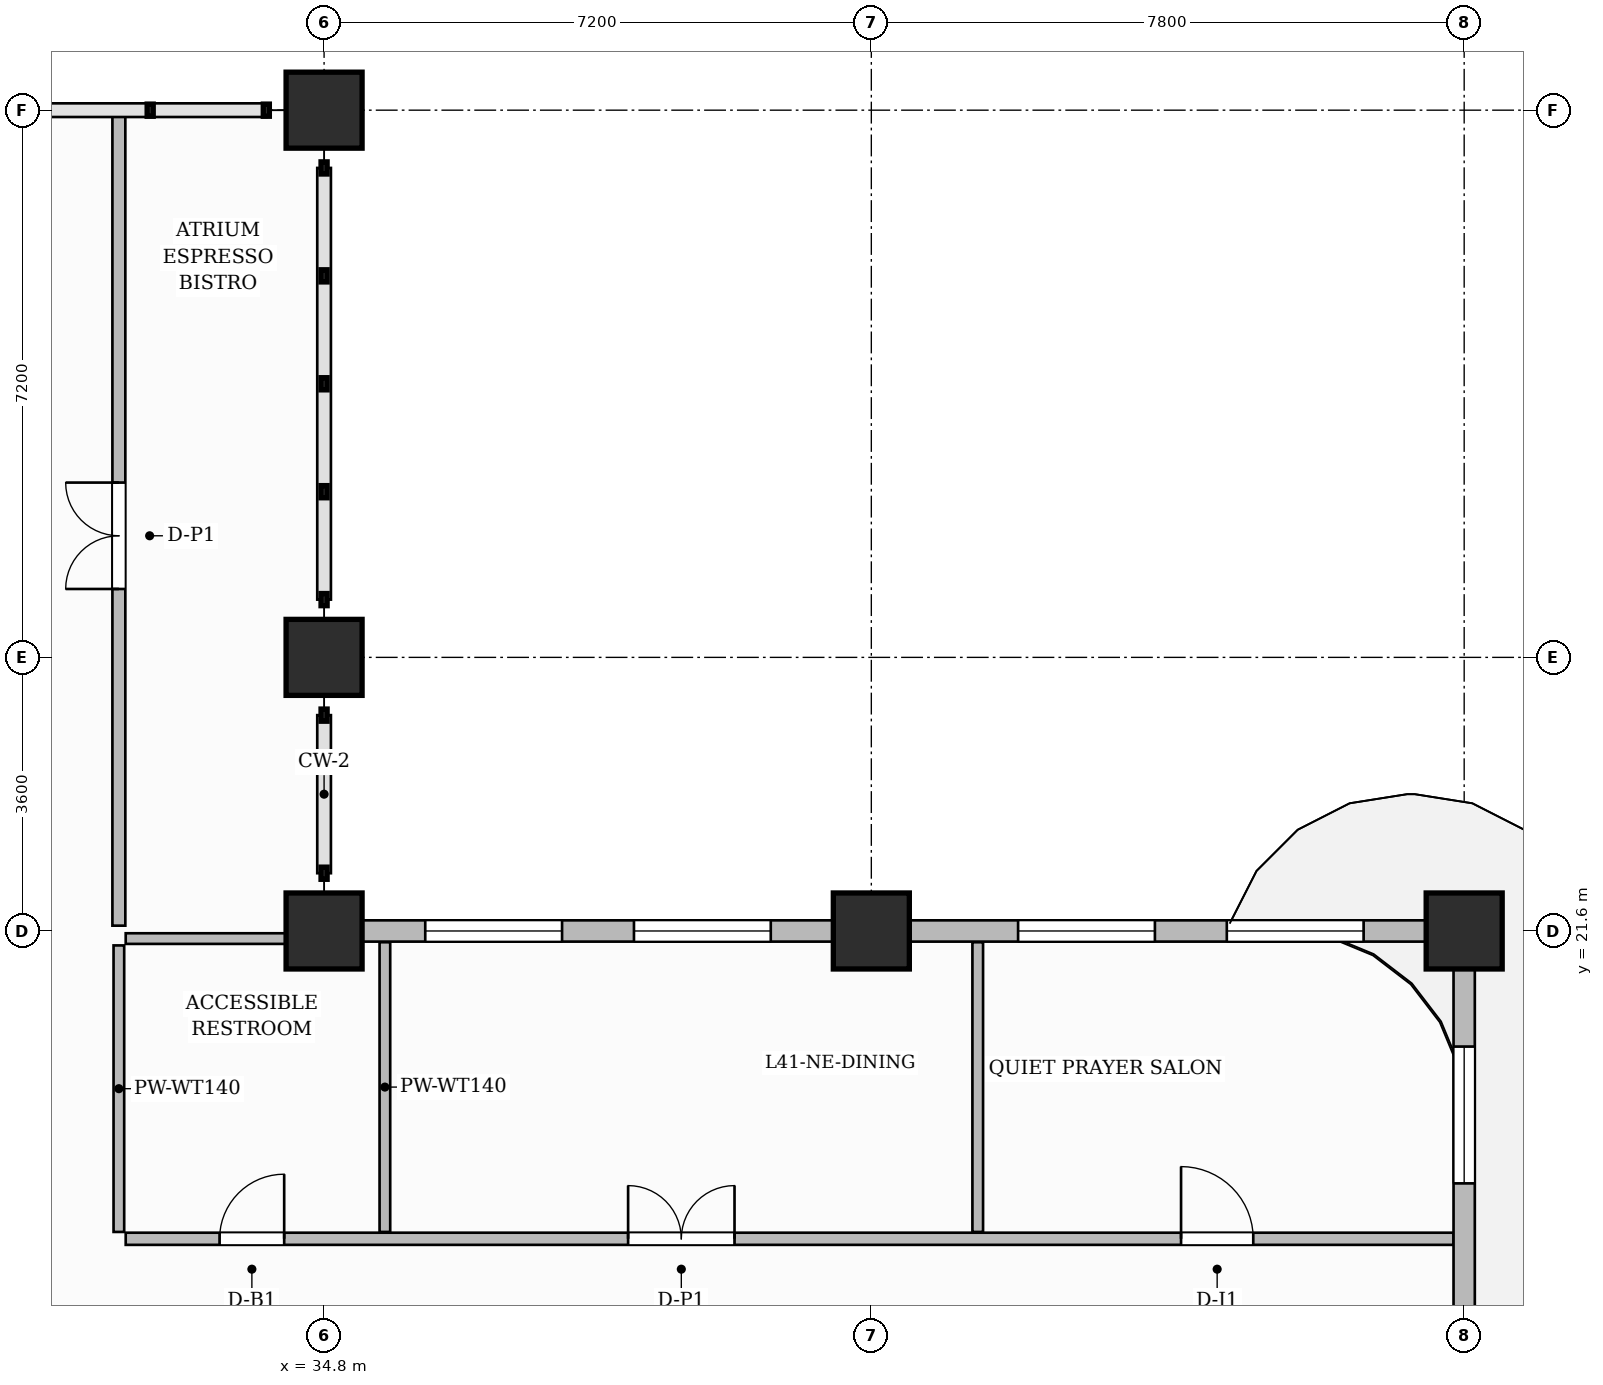
"""IFC4 building model, lengths in metres.
Left out: names, types, materials, properties, quantities, classifications, styles, units other than length and angle.
Written with IfcOpenShell. Run it as: python <this file> out.ifc"""

import sys

from ifc_helpers import new_model, si_unit, direction, frame, frame_2d, origin, origin_2d, place, context, subcontext, project, spatial, rectangle, extrude, source, transform, mapped, element, fill, save


model = new_model("IFC4")
c1 = context("Model", 3, precision=1e-05, world=origin(), true_north=direction((0.0, 1.0)))
c2 = subcontext(c1, "Body", "Model", "MODEL_VIEW")
j1 = project(units=[si_unit("LENGTHUNIT", "METRE"), si_unit("PLANEANGLEUNIT", "RADIAN")], contexts=[c1])
p1 = place(None, origin())
s1 = spatial("IfcSite", under=j1, at=p1, CompositionType="ELEMENT")
p2 = place(p1, origin())
s2 = spatial("IfcBuilding", under=s1, at=p2, CompositionType="ELEMENT")
p3 = place(p2, frame((0.0, 0.0, 165.7)))
s3 = spatial("IfcBuildingStorey", under=s2, at=p3, CompositionType="ELEMENT", Elevation=165.7)
m1 = source(origin(), c2, "Body", "SweptSolid", [
    extrude(rectangle(XDim=1.0, YDim=1.0, at=origin_2d()), origin(), (0.0, 0.0, 1.0), 3.85),
])
for number, where, z_axis, x_axis in (
    (1, (34.8, 21.6, 0.0), (0.0, 0.0, 1.0), (1.0, 0.0, 0.0)),
    (2, (34.8, 25.2, 0.0), (0.0, 0.0, 1.0), (1.0, 0.0, 0.0)),
    (3, (34.8, 32.4, 0.0), (0.0, 0.0, 1.0), (1.0, 0.0, 0.0)),
    (4, (42.0, 21.6, 0.0), (0.0, 0.0, 1.0), (1.0, 0.0, 0.0)),
    (5, (49.8, 21.6, 0.0), (0.0, 0.0, 1.0), (1.0, 0.0, 0.0)),
):
    element("IfcColumn", number, at=place(p3, frame(where, z_axis=z_axis, x_axis=x_axis)), inside=s3, PredefinedType="COLUMN", context=c2, shape_type="MappedRepresentation", body=[
        mapped(m1, transform((0.0, 0.0, 0.0), scale=1.0)),
    ])
p4 = place(p3, frame((32.19, 17.55, 0.0), z_axis=(0.0, 0.0, 1.0), x_axis=(1.0, 0.0, 0.0)))
e6 = element("IfcWall", 6, at=p4, inside=s3, PredefinedType="PARTITIONING", context=c2, shape_type="SweptSolid", body=[
    extrude(rectangle(XDim=17.47, YDim=0.16, at=frame_2d((8.735, 0.0))), origin(), (0.0, 0.0, 1.0), 3.6),
])
p5 = place(p4, frame((1.235, 0.0, 0.0)))
e7 = element("IfcOpeningElement", 7, at=p5, cuts=e6, PredefinedType="OPENING", context=c2, shape_type="SweptSolid", body=[
    extrude(rectangle(XDim=0.85, YDim=2.1, at=frame_2d((0.425, 1.05))), frame((0.0, 0.09, 0.0), z_axis=(0.0, -1.0, 0.0), x_axis=(1.0, 0.0, 0.0)), (0.0, 0.0, 1.0), 0.18),
])
p6 = place(p4, frame((6.61, 0.0, 0.0)))
e8 = element("IfcOpeningElement", 8, at=p6, cuts=e6, PredefinedType="OPENING", context=c2, shape_type="SweptSolid", body=[
    extrude(rectangle(XDim=1.4, YDim=2.35, at=frame_2d((0.7, 1.175))), frame((0.0, 0.09, 0.0), z_axis=(0.0, -1.0, 0.0), x_axis=(1.0, 0.0, 0.0)), (0.0, 0.0, 1.0), 0.18),
])
p7 = place(p4, frame((13.885, 0.0, 0.0)))
e9 = element("IfcOpeningElement", 9, at=p7, cuts=e6, PredefinedType="OPENING", context=c2, shape_type="SweptSolid", body=[
    extrude(rectangle(XDim=0.95, YDim=2.15, at=frame_2d((0.475, 1.075))), frame((0.0, 0.09, 0.0), z_axis=(0.0, -1.0, 0.0), x_axis=(1.0, 0.0, 0.0)), (0.0, 0.0, 1.0), 0.18),
])
p8 = place(p3, frame((32.1, 17.64, 0.0), z_axis=(0.0, 0.0, 1.0), x_axis=(0.0, 1.0, 0.0)))
e10 = element("IfcWall", 10, at=p8, inside=s3, PredefinedType="PARTITIONING", context=c2, shape_type="SweptSolid", body=[
    extrude(rectangle(XDim=3.77, YDim=0.14, at=frame_2d((1.885, 0.0))), origin(), (0.0, 0.0, 1.0), 3.6),
])
for number, where, z_axis, x_axis in (
    (11, (35.6, 17.64, 0.0), (0.0, 0.0, 1.0), (0.0, 1.0, 0.0)),
    (12, (43.4, 17.64, 0.0), (0.0, 0.0, 1.0), (0.0, 1.0, 0.0)),
):
    element("IfcWall", number, at=place(p3, frame(where, z_axis=z_axis, x_axis=x_axis)), inside=s3, PredefinedType="PARTITIONING", context=c2, shape_type="SweptSolid", body=[
        extrude(rectangle(XDim=3.812, YDim=0.14, at=frame_2d((1.906, 0.0))), origin(), (0.0, 0.0, 1.0), 3.6),
    ])
p9 = place(p3, frame((32.19, 21.5, 0.0), z_axis=(0.0, 0.0, 1.0), x_axis=(1.0, 0.0, 0.0)))
e13 = element("IfcWall", 13, at=p9, inside=s3, PredefinedType="PARTITIONING", context=c2, shape_type="SweptSolid", body=[
    extrude(rectangle(XDim=2.42, YDim=0.14, at=frame_2d((1.21, 0.0))), origin(), (0.0, 0.0, 1.0), 3.085),
])
p10 = place(p3, frame((32.1, 21.67, 0.0), z_axis=(0.0, 0.0, 1.0), x_axis=(0.0, 1.0, 0.0)))
e14 = element("IfcWall", 14, at=p10, inside=s3, PredefinedType="PARTITIONING", context=c2, shape_type="SweptSolid", body=[
    extrude(rectangle(XDim=10.702, YDim=0.17, at=frame_2d((5.351, 0.0))), origin(), (0.0, 0.0, 1.0), 3.6),
])
p11 = place(p10, frame((4.43, 0.0, 0.0)))
e15 = element("IfcOpeningElement", 15, at=p11, cuts=e14, PredefinedType="OPENING", context=c2, shape_type="SweptSolid", body=[
    extrude(rectangle(XDim=1.4, YDim=2.35, at=frame_2d((0.7, 1.175))), frame((0.0, 0.095, 0.0), z_axis=(0.0, -1.0, 0.0), x_axis=(1.0, 0.0, 0.0)), (0.0, 0.0, 1.0), 0.19),
])
p12 = place(p3, frame((49.8, 14.62, 0.0), z_axis=(0.0, 0.0, 1.0), x_axis=(0.0, 1.0, 0.0)))
e16 = element("IfcWall", 16, at=p12, inside=s3, PredefinedType="SOLIDWALL", context=c2, shape_type="SweptSolid", body=[
    extrude(rectangle(XDim=6.93, YDim=0.28, at=frame_2d((3.465, 0.0))), origin(), (0.0, 0.0, 1.0), 3.085),
])
p13 = place(p12, frame((0.42, 0.0, 0.0)))
e17 = element("IfcOpeningElement", 17, at=p13, cuts=e16, PredefinedType="OPENING", context=c2, shape_type="SweptSolid", body=[
    extrude(rectangle(XDim=1.2, YDim=2.2, at=frame_2d((0.6, 1.1))), frame((0.0, 0.15, 0.0), z_axis=(0.0, -1.0, 0.0), x_axis=(1.0, 0.0, 0.0)), (0.0, 0.0, 1.0), 0.3),
])
p14 = place(p12, frame((3.659, 0.0, 0.8)))
e18 = element("IfcOpeningElement", 18, at=p14, cuts=e16, PredefinedType="OPENING", context=c2, shape_type="SweptSolid", body=[
    extrude(rectangle(XDim=1.8, YDim=1.85, at=frame_2d((0.9, 0.925))), frame((0.0, 0.15, 0.0), z_axis=(0.0, -1.0, 0.0), x_axis=(1.0, 0.0, 0.0)), (0.0, 0.0, 1.0), 0.3),
])
p15 = place(p3, frame((34.8, 21.6, 0.0), z_axis=(0.0, 0.0, 1.0), x_axis=(1.0, 0.0, 0.0)))
e19 = element("IfcWall", 19, at=p15, inside=s3, PredefinedType="SOLIDWALL", context=c2, shape_type="SweptSolid", body=[
    extrude(rectangle(XDim=15.0, YDim=0.28, at=frame_2d((7.5, 0.0))), origin(), (0.0, 0.0, 1.0), 3.085),
])
p16 = place(p15, frame((1.331, 0.0, 0.8)))
e20 = element("IfcOpeningElement", 20, at=p16, cuts=e19, PredefinedType="OPENING", context=c2, shape_type="SweptSolid", body=[
    extrude(rectangle(XDim=1.8, YDim=1.85, at=frame_2d((0.9, 0.925))), frame((0.0, 0.15, 0.0), z_axis=(0.0, -1.0, 0.0), x_axis=(1.0, 0.0, 0.0)), (0.0, 0.0, 1.0), 0.3),
])
p17 = place(p15, frame((4.077, 0.0, 0.8)))
e21 = element("IfcOpeningElement", 21, at=p17, cuts=e19, PredefinedType="OPENING", context=c2, shape_type="SweptSolid", body=[
    extrude(rectangle(XDim=1.8, YDim=1.85, at=frame_2d((0.9, 0.925))), frame((0.0, 0.15, 0.0), z_axis=(0.0, -1.0, 0.0), x_axis=(1.0, 0.0, 0.0)), (0.0, 0.0, 1.0), 0.3),
])
p18 = place(p15, frame((9.131, 0.0, 0.8)))
e22 = element("IfcOpeningElement", 22, at=p18, cuts=e19, PredefinedType="OPENING", context=c2, shape_type="SweptSolid", body=[
    extrude(rectangle(XDim=1.8, YDim=1.85, at=frame_2d((0.9, 0.925))), frame((0.0, 0.15, 0.0), z_axis=(0.0, -1.0, 0.0), x_axis=(1.0, 0.0, 0.0)), (0.0, 0.0, 1.0), 0.3),
])
p19 = place(p15, frame((11.877, 0.0, 0.8)))
e23 = element("IfcOpeningElement", 23, at=p19, cuts=e19, PredefinedType="OPENING", context=c2, shape_type="SweptSolid", body=[
    extrude(rectangle(XDim=1.8, YDim=1.85, at=frame_2d((0.9, 0.925))), frame((0.0, 0.15, 0.0), z_axis=(0.0, -1.0, 0.0), x_axis=(1.0, 0.0, 0.0)), (0.0, 0.0, 1.0), 0.3),
])
m2 = source(origin(), c2, "Body", "SweptSolid", [
    extrude(rectangle(XDim=0.85, YDim=2.1, at=frame_2d((0.425, 1.05))), frame((0.0, 0.025, 0.0), z_axis=(0.0, -1.0, 0.0), x_axis=(1.0, 0.0, 0.0)), (0.0, 0.0, 1.0), 0.05),
])
p20 = place(p5, origin())
e24 = element("IfcDoor", 24, at=p20, inside=s3, OperationType="SINGLE_SWING_RIGHT", PredefinedType="DOOR", context=c2, shape_type="MappedRepresentation", body=[
    mapped(m2, transform((0.0, 0.0, 0.0), scale=1.0)),
])
fill(e7, e24)
m3 = source(origin(), c2, "Body", "SweptSolid", [
    extrude(rectangle(XDim=1.4, YDim=2.35, at=frame_2d((0.7, 1.175))), frame((0.0, 0.025, 0.0), z_axis=(0.0, -1.0, 0.0), x_axis=(1.0, 0.0, 0.0)), (0.0, 0.0, 1.0), 0.05),
])
p21 = place(p6, origin())
e25 = element("IfcDoor", 25, at=p21, inside=s3, OperationType="DOUBLE_DOOR_SINGLE_SWING", PredefinedType="DOOR", context=c2, shape_type="MappedRepresentation", body=[
    mapped(m3, transform((0.0, 0.0, 0.0), scale=1.0)),
])
fill(e8, e25)
m4 = source(origin(), c2, "Body", "SweptSolid", [
    extrude(rectangle(XDim=0.95, YDim=2.15, at=frame_2d((0.475, 1.075))), frame((0.0, 0.025, 0.0), z_axis=(0.0, -1.0, 0.0), x_axis=(1.0, 0.0, 0.0)), (0.0, 0.0, 1.0), 0.05),
])
p22 = place(p7, origin())
e26 = element("IfcDoor", 26, at=p22, inside=s3, OperationType="SINGLE_SWING_LEFT", PredefinedType="DOOR", context=c2, shape_type="MappedRepresentation", body=[
    mapped(m4, transform((0.0, 0.0, 0.0), scale=1.0)),
])
fill(e9, e26)
p23 = place(p11, origin())
e27 = element("IfcDoor", 27, at=p23, inside=s3, OperationType="DOUBLE_DOOR_SINGLE_SWING", PredefinedType="DOOR", context=c2, shape_type="MappedRepresentation", body=[
    mapped(m3, transform((0.0, 0.0, 0.0), scale=1.0)),
])
fill(e15, e27)
m5 = source(origin(), c2, "Body", "SweptSolid", [
    extrude(rectangle(XDim=1.8, YDim=1.85, at=frame_2d((0.9, 0.925))), frame((0.0, 0.03, 0.0), z_axis=(0.0, -1.0, 0.0), x_axis=(1.0, 0.0, 0.0)), (0.0, 0.0, 1.0), 0.06),
])
p24 = place(p14, origin())
e28 = element("IfcWindow", 28, at=p24, inside=s3, PartitioningType="DOUBLE_PANEL_VERTICAL", PredefinedType="WINDOW", context=c2, shape_type="MappedRepresentation", body=[
    mapped(m5, transform((0.0, 0.0, 0.0), scale=1.0)),
])
fill(e18, e28)
p25 = place(p16, origin())
e29 = element("IfcWindow", 29, at=p25, inside=s3, PartitioningType="DOUBLE_PANEL_VERTICAL", PredefinedType="WINDOW", context=c2, shape_type="MappedRepresentation", body=[
    mapped(m5, transform((0.0, 0.0, 0.0), scale=1.0)),
])
fill(e20, e29)
p26 = place(p17, origin())
e30 = element("IfcWindow", 30, at=p26, inside=s3, PartitioningType="DOUBLE_PANEL_VERTICAL", PredefinedType="WINDOW", context=c2, shape_type="MappedRepresentation", body=[
    mapped(m5, transform((0.0, 0.0, 0.0), scale=1.0)),
])
fill(e21, e30)
p27 = place(p18, origin())
e31 = element("IfcWindow", 31, at=p27, inside=s3, PartitioningType="DOUBLE_PANEL_VERTICAL", PredefinedType="WINDOW", context=c2, shape_type="MappedRepresentation", body=[
    mapped(m5, transform((0.0, 0.0, 0.0), scale=1.0)),
])
fill(e22, e31)
p28 = place(p19, origin())
e32 = element("IfcWindow", 32, at=p28, inside=s3, PartitioningType="DOUBLE_PANEL_VERTICAL", PredefinedType="WINDOW", context=c2, shape_type="MappedRepresentation", body=[
    mapped(m5, transform((0.0, 0.0, 0.0), scale=1.0)),
])
fill(e23, e32)
save(model, sys.argv[1])
